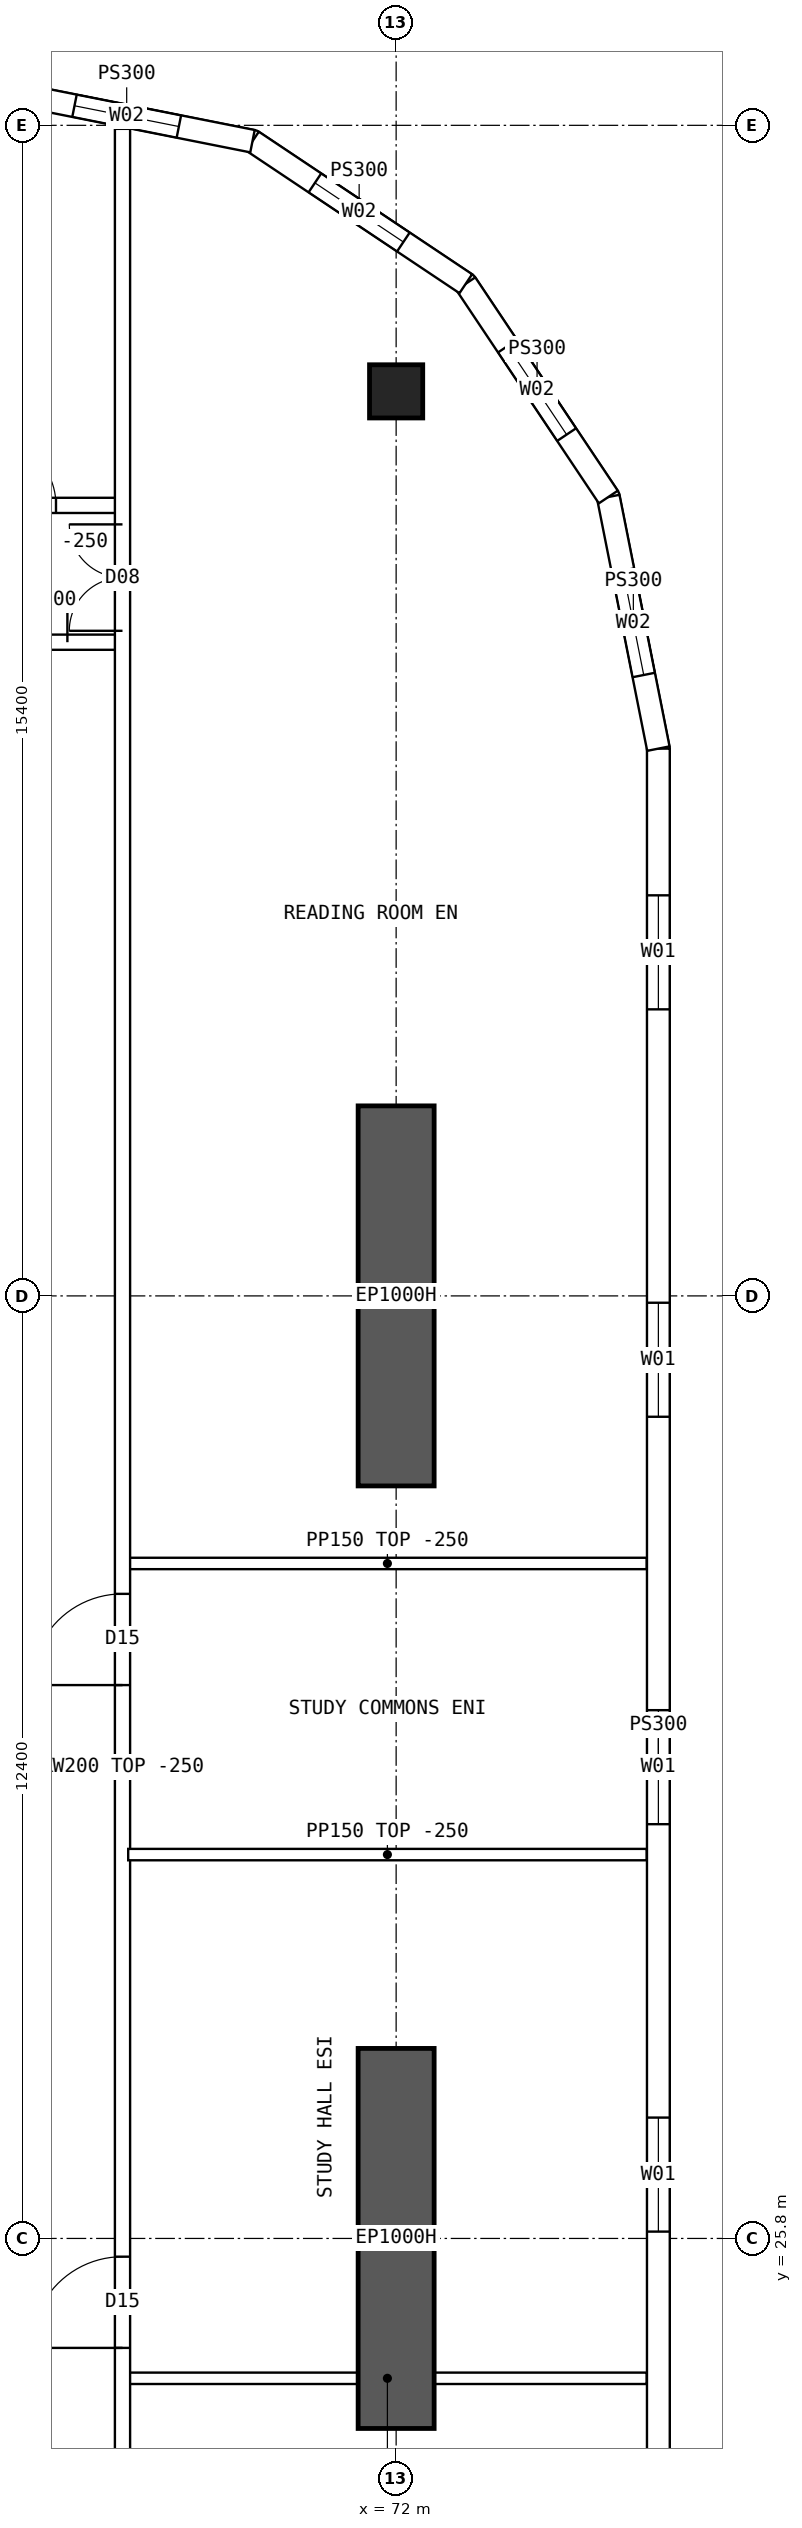
"""IFC4 building model, lengths in metres.
Left out: names, types, materials, properties, quantities, classifications, styles, units other than length and angle.
Written with IfcOpenShell. Run it as: python <this file> out.ifc"""

import sys

from ifc_helpers import new_model, si_unit, direction, frame, frame_2d, origin, origin_2d, place, context, subcontext, project, spatial, polyline, rectangle, hollow_rectangle, outline, extrude, element, fill, save


model = new_model("IFC4")
c1 = context("Model", 3, precision=1e-05, world=origin(), true_north=direction((0.0, 1.0)))
c2 = subcontext(c1, "Body", "Model", "MODEL_VIEW")
j1 = project(units=[si_unit("LENGTHUNIT", "METRE"), si_unit("PLANEANGLEUNIT", "RADIAN")], contexts=[c1])
p1 = place(None, origin())
s1 = spatial("IfcSite", under=j1, at=p1, CompositionType="ELEMENT")
p2 = place(p1, origin())
s2 = spatial("IfcBuilding", under=s1, at=p2, CompositionType="ELEMENT")
p3 = place(p2, frame((0.0, 0.0, 167.35)))
s3 = spatial("IfcBuildingStorey", under=s2, at=p3, CompositionType="ELEMENT", Elevation=167.35)
p4 = place(p3, frame((72.0, 50.1, 0.0), z_axis=(0.0, 0.0, 1.0), x_axis=(1.0, 0.0, 0.0)))
e1 = element("IfcColumn", 1, at=p4, inside=s3, PredefinedType="COLUMN", context=c2, shape_type="SweptSolid", body=[
    extrude(hollow_rectangle(XDim=0.7, YDim=0.7, WallThickness=0.07, at=origin_2d()), origin(), (0.0, 0.0, 1.0), 3.75),
])
for number, where, z_axis, x_axis in (
    (2, (72.0, 23.3, 0.0), (0.0, 0.0, 1.0), (0.0, 1.0, 0.0)),
    (3, (72.0, 35.7, 0.0), (0.0, 0.0, 1.0), (0.0, 1.0, 0.0)),
):
    element("IfcWall", number, at=place(p3, frame(where, z_axis=z_axis, x_axis=x_axis)), inside=s3, PredefinedType="SHEAR", context=c2, shape_type="SweptSolid", body=[
        extrude(rectangle(XDim=5.0, YDim=1.0, at=frame_2d((2.5, 0.0))), origin(), (0.0, 0.0, 1.0), 3.75),
    ])
p5 = place(p3, frame((75.45, 18.6, 0.0), z_axis=(0.0, 0.0, 1.0), x_axis=(0.0, 1.0, 0.0)))
e4 = element("IfcWall", 4, at=p5, inside=s3, PredefinedType="SOLIDWALL", context=c2, shape_type="SweptSolid", body=[
    extrude(outline(polyline([(-0.015, -0.15), (26.815, -0.15), (26.785, 0.15), (0.015, 0.15), (-0.015, -0.15)])), origin(), (0.0, 0.0, 1.0), 3.5),
])
p6 = place(p5, frame((1.93, 0.0, 0.9)))
e5 = element("IfcOpeningElement", 5, at=p6, cuts=e4, PredefinedType="OPENING", context=c2, shape_type="SweptSolid", body=[
    extrude(rectangle(XDim=1.5, YDim=2.0, at=frame_2d((0.75, 1.0))), frame((0.0, 0.16, 0.0), z_axis=(0.0, -1.0, 0.0), x_axis=(1.0, 0.0, 0.0)), (0.0, 0.0, 1.0), 0.32),
])
p7 = place(p5, frame((7.29, 0.0, 0.9)))
e6 = element("IfcOpeningElement", 6, at=p7, cuts=e4, PredefinedType="OPENING", context=c2, shape_type="SweptSolid", body=[
    extrude(rectangle(XDim=1.5, YDim=2.0, at=frame_2d((0.75, 1.0))), frame((0.0, 0.16, 0.0), z_axis=(0.0, -1.0, 0.0), x_axis=(1.0, 0.0, 0.0)), (0.0, 0.0, 1.0), 0.32),
])
p8 = place(p5, frame((12.65, 0.0, 0.9)))
e7 = element("IfcOpeningElement", 7, at=p8, cuts=e4, PredefinedType="OPENING", context=c2, shape_type="SweptSolid", body=[
    extrude(rectangle(XDim=1.5, YDim=2.0, at=frame_2d((0.75, 1.0))), frame((0.0, 0.16, 0.0), z_axis=(0.0, -1.0, 0.0), x_axis=(1.0, 0.0, 0.0)), (0.0, 0.0, 1.0), 0.32),
])
p9 = place(p5, frame((18.01, 0.0, 0.9)))
e8 = element("IfcOpeningElement", 8, at=p9, cuts=e4, PredefinedType="OPENING", context=c2, shape_type="SweptSolid", body=[
    extrude(rectangle(XDim=1.5, YDim=2.0, at=frame_2d((0.75, 1.0))), frame((0.0, 0.16, 0.0), z_axis=(0.0, -1.0, 0.0), x_axis=(1.0, 0.0, 0.0)), (0.0, 0.0, 1.0), 0.32),
])
p10 = place(p5, frame((23.37, 0.0, 0.9)))
e9 = element("IfcOpeningElement", 9, at=p10, cuts=e4, PredefinedType="OPENING", context=c2, shape_type="SweptSolid", body=[
    extrude(rectangle(XDim=1.5, YDim=2.0, at=frame_2d((0.75, 1.0))), frame((0.0, 0.16, 0.0), z_axis=(0.0, -1.0, 0.0), x_axis=(1.0, 0.0, 0.0)), (0.0, 0.0, 1.0), 0.32),
])
p11 = place(p3, frame((75.45, 45.4, 0.0), z_axis=(0.0, 0.0, 1.0), x_axis=(-0.19508664885, 0.980786011034, 0.0)))
e10 = element("IfcWall", 10, at=p11, inside=s3, PredefinedType="SOLIDWALL", context=c2, shape_type="SweptSolid", body=[
    extrude(outline(polyline([(-0.015, -0.15), (3.405, -0.15), (3.345, 0.15), (0.015, 0.15), (-0.015, -0.15)])), origin(), (0.0, 0.0, 1.0), 3.5),
])
p12 = place(p11, frame((0.988, 0.0, 0.9)))
e11 = element("IfcOpeningElement", 11, at=p12, cuts=e10, PredefinedType="OPENING", context=c2, shape_type="SweptSolid", body=[
    extrude(rectangle(XDim=1.4, YDim=1.8, at=frame_2d((0.7, 0.9))), frame((0.0, 0.16, 0.0), z_axis=(0.0, -1.0, 0.0), x_axis=(1.0, 0.0, 0.0)), (0.0, 0.0, 1.0), 0.32),
])
p13 = place(p3, frame((74.792, 48.71, 0.0), z_axis=(0.0, 0.0, 1.0), x_axis=(-0.555534554399, 0.831493450887, 0.0)))
e12 = element("IfcWall", 12, at=p13, inside=s3, PredefinedType="SOLIDWALL", context=c2, shape_type="SweptSolid", body=[
    extrude(outline(polyline([(-0.03, -0.15), (3.405, -0.15), (3.345, 0.15), (0.03, 0.15), (-0.03, -0.15)])), origin(), (0.0, 0.0, 1.0), 3.5),
])
p14 = place(p13, frame((0.988, 0.0, 0.9)))
e13 = element("IfcOpeningElement", 13, at=p14, cuts=e12, PredefinedType="OPENING", context=c2, shape_type="SweptSolid", body=[
    extrude(rectangle(XDim=1.4, YDim=1.8, at=frame_2d((0.7, 0.9))), frame((0.0, 0.16, 0.0), z_axis=(0.0, -1.0, 0.0), x_axis=(1.0, 0.0, 0.0)), (0.0, 0.0, 1.0), 0.32),
])
p15 = place(p3, frame((72.917, 51.517, 0.0), z_axis=(0.0, 0.0, 1.0), x_axis=(-0.831493450887, 0.555534554399, 0.0)))
e14 = element("IfcWall", 14, at=p15, inside=s3, PredefinedType="SOLIDWALL", context=c2, shape_type="SweptSolid", body=[
    extrude(outline(polyline([(-0.03, -0.15), (3.405, -0.15), (3.345, 0.15), (0.03, 0.15), (-0.03, -0.15)])), origin(), (0.0, 0.0, 1.0), 3.5),
])
p16 = place(p15, frame((0.988, 0.0, 0.9)))
e15 = element("IfcOpeningElement", 15, at=p16, cuts=e14, PredefinedType="OPENING", context=c2, shape_type="SweptSolid", body=[
    extrude(rectangle(XDim=1.4, YDim=1.8, at=frame_2d((0.7, 0.9))), frame((0.0, 0.16, 0.0), z_axis=(0.0, -1.0, 0.0), x_axis=(1.0, 0.0, 0.0)), (0.0, 0.0, 1.0), 0.32),
])
p17 = place(p3, frame((70.11, 53.392, 0.0), z_axis=(0.0, 0.0, 1.0), x_axis=(-0.98078325777, 0.195100490205, 0.0)))
e16 = element("IfcWall", 16, at=p17, inside=s3, PredefinedType="SOLIDWALL", context=c2, shape_type="SweptSolid", body=[
    extrude(outline(polyline([(-0.03, -0.15), (3.405, -0.15), (3.345, 0.15), (0.03, 0.15), (-0.03, -0.15)])), origin(), (0.0, 0.0, 1.0), 3.5),
])
p18 = place(p17, frame((0.988, 0.0, 0.9)))
e17 = element("IfcOpeningElement", 17, at=p18, cuts=e16, PredefinedType="OPENING", context=c2, shape_type="SweptSolid", body=[
    extrude(rectangle(XDim=1.4, YDim=1.8, at=frame_2d((0.7, 0.9))), frame((0.0, 0.16, 0.0), z_axis=(0.0, -1.0, 0.0), x_axis=(1.0, 0.0, 0.0)), (0.0, 0.0, 1.0), 0.32),
])
p19 = place(p3, frame((66.425, 48.6, 0.0), z_axis=(0.0, 0.0, 1.0), x_axis=(1.0, 0.0, 0.0)))
e18 = element("IfcWall", 18, at=p19, inside=s3, PredefinedType="SOLIDWALL", context=c2, shape_type="SweptSolid", body=[
    extrude(rectangle(XDim=1.975, YDim=0.2, at=frame_2d((0.987, 0.0))), origin(), (0.0, 0.0, 1.0), 3.5),
])
p20 = place(p19, frame((0.2, 0.0, 0.0)))
e19 = element("IfcOpeningElement", 19, at=p20, cuts=e18, PredefinedType="OPENING", context=c2, shape_type="SweptSolid", body=[
    extrude(rectangle(XDim=0.9, YDim=2.1, at=frame_2d((0.45, 1.05))), frame((0.0, 0.11, 0.0), z_axis=(0.0, -1.0, 0.0), x_axis=(1.0, 0.0, 0.0)), (0.0, 0.0, 1.0), 0.22),
])
p21 = place(p3, frame((66.425, 46.8, 0.0), z_axis=(0.0, 0.0, 1.0), x_axis=(1.0, 0.0, 0.0)))
e20 = element("IfcWall", 20, at=p21, inside=s3, PredefinedType="SOLIDWALL", context=c2, shape_type="SweptSolid", body=[
    extrude(rectangle(XDim=1.975, YDim=0.2, at=frame_2d((0.987, 0.0))), origin(), (0.0, 0.0, 1.0), 3.5),
])
p22 = place(p21, frame((0.05, 0.0, 0.0)))
e21 = element("IfcOpeningElement", 21, at=p22, cuts=e20, PredefinedType="OPENING", context=c2, shape_type="SweptSolid", body=[
    extrude(rectangle(XDim=1.2, YDim=2.1, at=frame_2d((0.6, 1.05))), frame((0.0, 0.11, 0.0), z_axis=(0.0, -1.0, 0.0), x_axis=(1.0, 0.0, 0.0)), (0.0, 0.0, 1.0), 0.22),
])
p23 = place(p3, frame((68.475, 30.85, 0.0), z_axis=(0.0, 0.0, 1.0), x_axis=(1.0, 0.0, 0.0)))
e22 = element("IfcWall", 22, at=p23, inside=s3, PredefinedType="PARTITIONING", context=c2, shape_type="SweptSolid", body=[
    extrude(outline(polyline([(0.0, 0.0), (6.82, 0.0), (6.82, 3.5), (3.827, 3.5), (3.825, 3.05), (3.227, 3.05), (3.225, 3.5), (0.0, 3.5), (0.0, 0.0)])), frame((0.0, 0.075, 0.0), z_axis=(0.0, -1.0, 0.0), x_axis=(1.0, 0.0, 0.0)), (0.0, 0.0, 1.0), 0.15),
])
p24 = place(p3, frame((68.4, 10.446, 0.0), z_axis=(0.0, 0.0, 1.0), x_axis=(0.0, 1.0, 0.0)))
e23 = element("IfcWall", 23, at=p24, inside=s3, PredefinedType="SOLIDWALL", context=c2, shape_type="SweptSolid", body=[
    extrude(rectangle(XDim=43.107, YDim=0.2, at=frame_2d((21.554, 0.0))), origin(), (0.0, 0.0, 1.0), 3.5),
])
p25 = place(p24, frame((13.914, 0.0, 0.0)))
e24 = element("IfcOpeningElement", 24, at=p25, cuts=e23, PredefinedType="OPENING", context=c2, shape_type="SweptSolid", body=[
    extrude(rectangle(XDim=1.2, YDim=2.1, at=frame_2d((0.6, 1.05))), frame((0.0, 0.11, 0.0), z_axis=(0.0, -1.0, 0.0), x_axis=(1.0, 0.0, 0.0)), (0.0, 0.0, 1.0), 0.22),
])
p26 = place(p24, frame((22.634, 0.0, 0.0)))
e25 = element("IfcOpeningElement", 25, at=p26, cuts=e23, PredefinedType="OPENING", context=c2, shape_type="SweptSolid", body=[
    extrude(rectangle(XDim=1.2, YDim=2.1, at=frame_2d((0.6, 1.05))), frame((0.0, 0.11, 0.0), z_axis=(0.0, -1.0, 0.0), x_axis=(1.0, 0.0, 0.0)), (0.0, 0.0, 1.0), 0.22),
])
p27 = place(p24, frame((5.104, 0.0, 0.0)))
e26 = element("IfcOpeningElement", 26, at=p27, cuts=e23, PredefinedType="OPENING", context=c2, shape_type="SweptSolid", body=[
    extrude(rectangle(XDim=1.4, YDim=2.1, at=frame_2d((0.7, 1.05))), frame((0.0, 0.11, 0.0), z_axis=(0.0, -1.0, 0.0), x_axis=(1.0, 0.0, 0.0)), (0.0, 0.0, 1.0), 0.22),
])
p28 = place(p24, frame((36.504, 0.0, 0.0)))
e27 = element("IfcOpeningElement", 27, at=p28, cuts=e23, PredefinedType="OPENING", context=c2, shape_type="SweptSolid", body=[
    extrude(rectangle(XDim=1.4, YDim=2.1, at=frame_2d((0.7, 1.05))), frame((0.0, 0.11, 0.0), z_axis=(0.0, -1.0, 0.0), x_axis=(1.0, 0.0, 0.0)), (0.0, 0.0, 1.0), 0.22),
])
p29 = place(p3, frame((68.475, 23.96, 0.0), z_axis=(0.0, 0.0, 1.0), x_axis=(1.0, 0.0, 0.0)))
e28 = element("IfcWall", 28, at=p29, inside=s3, PredefinedType="PARTITIONING", context=c2, shape_type="SweptSolid", body=[
    extrude(rectangle(XDim=6.82, YDim=0.15, at=frame_2d((3.41, 0.0))), origin(), (0.0, 0.0, 1.0), 3.5),
])
p30 = place(p3, frame((68.475, 34.68, 0.0), z_axis=(0.0, 0.0, 1.0), x_axis=(1.0, 0.0, 0.0)))
e29 = element("IfcWall", 29, at=p30, inside=s3, PredefinedType="PARTITIONING", context=c2, shape_type="SweptSolid", body=[
    extrude(outline(polyline([(0.0, 0.0), (6.82, 0.0), (6.82, 3.5), (3.827, 3.5), (3.825, 3.05), (3.227, 3.05), (3.225, 3.5), (0.0, 3.5), (0.0, 0.0)])), frame((0.0, 0.075, 0.0), z_axis=(0.0, -1.0, 0.0), x_axis=(1.0, 0.0, 0.0)), (0.0, 0.0, 1.0), 0.15),
])
p31 = place(p7, origin())
e30 = element("IfcWindow", 30, at=p31, inside=s3, PartitioningType="SINGLE_PANEL", PredefinedType="WINDOW", context=c2, shape_type="SweptSolid", body=[
    extrude(rectangle(XDim=1.5, YDim=2.0, at=frame_2d((0.75, 1.0))), frame((0.0, 0.03, 0.0), z_axis=(0.0, -1.0, 0.0), x_axis=(1.0, 0.0, 0.0)), (0.0, 0.0, 1.0), 0.06),
])
fill(e6, e30)
p32 = place(p8, origin())
e31 = element("IfcWindow", 31, at=p32, inside=s3, PartitioningType="SINGLE_PANEL", PredefinedType="WINDOW", context=c2, shape_type="SweptSolid", body=[
    extrude(rectangle(XDim=1.5, YDim=2.0, at=frame_2d((0.75, 1.0))), frame((0.0, 0.03, 0.0), z_axis=(0.0, -1.0, 0.0), x_axis=(1.0, 0.0, 0.0)), (0.0, 0.0, 1.0), 0.06),
])
fill(e7, e31)
p33 = place(p9, origin())
e32 = element("IfcWindow", 32, at=p33, inside=s3, PartitioningType="SINGLE_PANEL", PredefinedType="WINDOW", context=c2, shape_type="SweptSolid", body=[
    extrude(rectangle(XDim=1.5, YDim=2.0, at=frame_2d((0.75, 1.0))), frame((0.0, 0.03, 0.0), z_axis=(0.0, -1.0, 0.0), x_axis=(1.0, 0.0, 0.0)), (0.0, 0.0, 1.0), 0.06),
])
fill(e8, e32)
p34 = place(p10, origin())
e33 = element("IfcWindow", 33, at=p34, inside=s3, PartitioningType="SINGLE_PANEL", PredefinedType="WINDOW", context=c2, shape_type="SweptSolid", body=[
    extrude(rectangle(XDim=1.5, YDim=2.0, at=frame_2d((0.75, 1.0))), frame((0.0, 0.03, 0.0), z_axis=(0.0, -1.0, 0.0), x_axis=(1.0, 0.0, 0.0)), (0.0, 0.0, 1.0), 0.06),
])
fill(e9, e33)
p35 = place(p12, origin())
e34 = element("IfcWindow", 34, at=p35, inside=s3, PartitioningType="SINGLE_PANEL", PredefinedType="WINDOW", context=c2, shape_type="SweptSolid", body=[
    extrude(rectangle(XDim=1.4, YDim=1.8, at=frame_2d((0.7, 0.9))), frame((0.0, 0.03, 0.0), z_axis=(0.0, -1.0, 0.0), x_axis=(1.0, 0.0, 0.0)), (0.0, 0.0, 1.0), 0.06),
])
fill(e11, e34)
p36 = place(p14, origin())
e35 = element("IfcWindow", 35, at=p36, inside=s3, PartitioningType="SINGLE_PANEL", PredefinedType="WINDOW", context=c2, shape_type="SweptSolid", body=[
    extrude(rectangle(XDim=1.4, YDim=1.8, at=frame_2d((0.7, 0.9))), frame((0.0, 0.03, 0.0), z_axis=(0.0, -1.0, 0.0), x_axis=(1.0, 0.0, 0.0)), (0.0, 0.0, 1.0), 0.06),
])
fill(e13, e35)
p37 = place(p16, origin())
e36 = element("IfcWindow", 36, at=p37, inside=s3, PartitioningType="SINGLE_PANEL", PredefinedType="WINDOW", context=c2, shape_type="SweptSolid", body=[
    extrude(rectangle(XDim=1.4, YDim=1.8, at=frame_2d((0.7, 0.9))), frame((0.0, 0.03, 0.0), z_axis=(0.0, -1.0, 0.0), x_axis=(1.0, 0.0, 0.0)), (0.0, 0.0, 1.0), 0.06),
])
fill(e15, e36)
p38 = place(p18, origin())
e37 = element("IfcWindow", 37, at=p38, inside=s3, PartitioningType="SINGLE_PANEL", PredefinedType="WINDOW", context=c2, shape_type="SweptSolid", body=[
    extrude(rectangle(XDim=1.4, YDim=1.8, at=frame_2d((0.7, 0.9))), frame((0.0, 0.03, 0.0), z_axis=(0.0, -1.0, 0.0), x_axis=(1.0, 0.0, 0.0)), (0.0, 0.0, 1.0), 0.06),
])
fill(e17, e37)
p39 = place(p22, origin())
e38 = element("IfcDoor", 38, at=p39, inside=s3, OperationType="DOUBLE_DOOR_SINGLE_SWING", PredefinedType="DOOR", context=c2, shape_type="SweptSolid", body=[
    extrude(rectangle(XDim=1.2, YDim=2.1, at=frame_2d((0.6, 1.05))), frame((0.0, 0.025, 0.0), z_axis=(0.0, -1.0, 0.0), x_axis=(1.0, 0.0, 0.0)), (0.0, 0.0, 1.0), 0.05),
])
fill(e21, e38)
p40 = place(p25, origin())
e39 = element("IfcDoor", 39, at=p40, inside=s3, OperationType="SINGLE_SWING_LEFT", PredefinedType="DOOR", context=c2, shape_type="SweptSolid", body=[
    extrude(rectangle(XDim=1.2, YDim=2.1, at=frame_2d((0.6, 1.05))), frame((0.0, 0.025, 0.0), z_axis=(0.0, -1.0, 0.0), x_axis=(1.0, 0.0, 0.0)), (0.0, 0.0, 1.0), 0.05),
])
fill(e24, e39)
p41 = place(p26, origin())
e40 = element("IfcDoor", 40, at=p41, inside=s3, OperationType="SINGLE_SWING_LEFT", PredefinedType="DOOR", context=c2, shape_type="SweptSolid", body=[
    extrude(rectangle(XDim=1.2, YDim=2.1, at=frame_2d((0.6, 1.05))), frame((0.0, 0.025, 0.0), z_axis=(0.0, -1.0, 0.0), x_axis=(1.0, 0.0, 0.0)), (0.0, 0.0, 1.0), 0.05),
])
fill(e25, e40)
p42 = place(p28, origin())
e41 = element("IfcDoor", 41, at=p42, inside=s3, OperationType="DOUBLE_DOOR_SINGLE_SWING", PredefinedType="DOOR", context=c2, shape_type="SweptSolid", body=[
    extrude(rectangle(XDim=1.4, YDim=2.1, at=frame_2d((0.7, 1.05))), frame((0.0, 0.025, 0.0), z_axis=(0.0, -1.0, 0.0), x_axis=(1.0, 0.0, 0.0)), (0.0, 0.0, 1.0), 0.05),
])
fill(e27, e41)
p43 = place(p20, origin())
e42 = element("IfcDoor", 42, at=p43, inside=s3, OperationType="SINGLE_SWING_LEFT", PredefinedType="DOOR", context=c2, shape_type="SweptSolid", body=[
    extrude(rectangle(XDim=0.9, YDim=2.1, at=frame_2d((0.45, 1.05))), frame((0.0, 0.025, 0.0), z_axis=(0.0, -1.0, 0.0), x_axis=(1.0, 0.0, 0.0)), (0.0, 0.0, 1.0), 0.05),
])
fill(e19, e42)
save(model, sys.argv[1])
